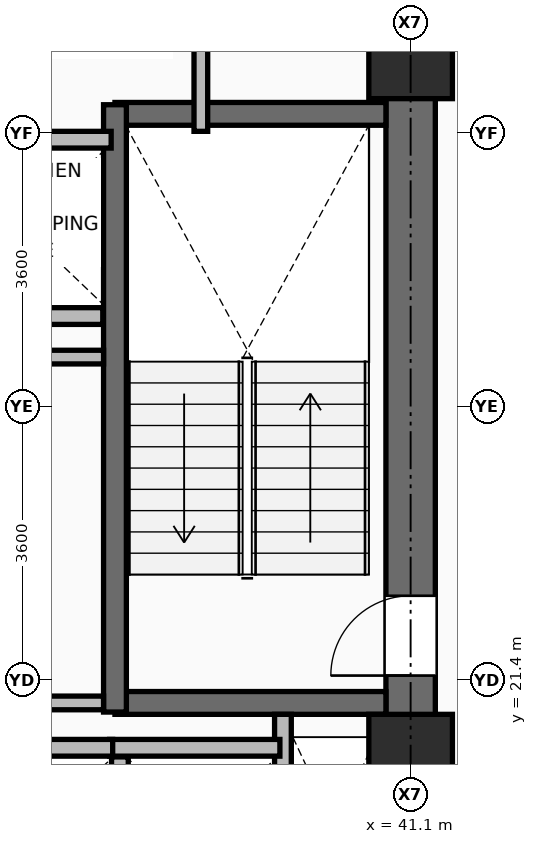
"""IFC4 building model, lengths in metres.
Left out: names, types, materials, properties, quantities, classifications, styles, units other than length and angle.
Written with IfcOpenShell. Run it as: python <this file> out.ifc"""

import sys

from ifc_helpers import new_model, si_unit, direction, frame, frame_2d, origin, origin_2d, place, context, subcontext, project, spatial, rectangle, extrude, element, fill, save


model = new_model("IFC4")
c1 = context("Model", 3, precision=1e-05, world=origin(), true_north=direction((0.0, 1.0)))
c2 = subcontext(c1, "Body", "Model", "MODEL_VIEW")
j1 = project(units=[si_unit("LENGTHUNIT", "METRE"), si_unit("PLANEANGLEUNIT", "RADIAN")], contexts=[c1])
p1 = place(None, origin())
s1 = spatial("IfcSite", under=j1, at=p1, CompositionType="ELEMENT")
p2 = place(p1, origin())
s2 = spatial("IfcBuilding", under=s1, at=p2, CompositionType="ELEMENT")
p3 = place(p2, frame((0.0, 0.0, 57.0)))
s3 = spatial("IfcBuildingStorey", under=s2, at=p3, CompositionType="ELEMENT", Elevation=57.0)
for number, where, z_axis, x_axis in (
    (1, (41.1, 20.4, 0.0), (0.0, 0.0, 1.0), (1.0, 0.0, 0.0)),
    (2, (41.1, 29.6, 0.0), (0.0, 0.0, 1.0), (1.0, 0.0, 0.0)),
):
    element("IfcColumn", number, at=place(p3, frame(where, z_axis=z_axis, x_axis=x_axis)), inside=s3, PredefinedType="COLUMN", context=c2, shape_type="SweptSolid", body=[
        extrude(rectangle(XDim=1.1, YDim=1.1, at=origin_2d()), origin(), (0.0, 0.0, 1.0), 3.75),
    ])
p4 = place(p3, frame((37.275, 18.08, 0.0), z_axis=(0.0, 0.0, 1.0), x_axis=(0.0, 1.0, 0.0)))
e3 = element("IfcWall", 3, at=p4, inside=s3, PredefinedType="PARTITIONING", context=c2, shape_type="SweptSolid", body=[
    extrude(rectangle(XDim=2.31, YDim=0.22, at=frame_2d((1.155, 0.0))), origin(), (0.0, 0.0, 1.0), 3.545),
])
p5 = place(p3, frame((34.91, 26.19, 0.0), z_axis=(0.0, 0.0, 1.0), x_axis=(1.0, 0.0, 0.0)))
e4 = element("IfcWall", 4, at=p5, inside=s3, PredefinedType="PARTITIONING", context=c2, shape_type="SweptSolid", body=[
    extrude(rectangle(XDim=2.14, YDim=0.22, at=frame_2d((1.07, 0.0))), origin(), (0.0, 0.0, 1.0), 3.545),
])
p6 = place(p3, frame((41.1, 18.125, 0.0), z_axis=(0.0, 0.0, 1.0), x_axis=(0.0, 1.0, 0.0)))
e5 = element("IfcWall", 5, at=p6, inside=s3, PredefinedType="SHEAR", context=c2, shape_type="SweptSolid", body=[
    extrude(rectangle(XDim=14.0, YDim=0.65, at=frame_2d((7.0, 0.0))), origin(), (0.0, 0.0, 1.0), 3.57),
])
p7 = place(p6, frame((3.335, 0.0, 0.0)))
e6 = element("IfcOpeningElement", 6, at=p7, cuts=e5, PredefinedType="OPENING", context=c2, shape_type="SweptSolid", body=[
    extrude(rectangle(XDim=1.05, YDim=2.1, at=frame_2d((0.525, 1.05))), frame((0.0, 0.335, 0.0), z_axis=(0.0, -1.0, 0.0), x_axis=(1.0, 0.0, 0.0)), (0.0, 0.0, 1.0), 0.67),
])
for number, where, z_axis, x_axis in (
    (7, (37.21, 21.1, 0.0), (0.0, 0.0, 1.0), (1.0, 0.0, 0.0)),
    (8, (37.21, 28.85, 0.0), (0.0, 0.0, 1.0), (1.0, 0.0, 0.0)),
):
    element("IfcWall", number, at=place(p3, frame(where, z_axis=z_axis, x_axis=x_axis)), inside=s3, PredefinedType="SHEAR", context=c2, shape_type="SweptSolid", body=[
        extrude(rectangle(XDim=3.565, YDim=0.3, at=frame_2d((1.782, 0.0))), origin(), (0.0, 0.0, 1.0), 3.57),
    ])
p8 = place(p3, frame((37.21, 20.98, 0.0), z_axis=(0.0, 0.0, 1.0), x_axis=(0.0, 1.0, 0.0)))
e9 = element("IfcWall", 9, at=p8, inside=s3, PredefinedType="SHEAR", context=c2, shape_type="SweptSolid", body=[
    extrude(rectangle(XDim=7.99, YDim=0.3, at=frame_2d((3.995, 0.0))), origin(), (0.0, 0.0, 1.0), 3.57),
])
p9 = place(p3, frame((39.42, 18.125, 0.0), z_axis=(0.0, 0.0, 1.0), x_axis=(0.0, 1.0, 0.0)))
e10 = element("IfcWall", 10, at=p9, inside=s3, PredefinedType="PARTITIONING", context=c2, shape_type="SweptSolid", body=[
    extrude(rectangle(XDim=2.825, YDim=0.22, at=frame_2d((1.413, 0.0))), origin(), (0.0, 0.0, 1.0), 3.55),
])
for number, where, z_axis, x_axis in (
    (11, (37.14, 20.51, 0.0), (0.0, 0.0, 1.0), (1.0, 0.0, 0.0)),
    (12, (34.94, 20.51, 0.0), (0.0, 0.0, 1.0), (1.0, 0.0, 0.0)),
):
    element("IfcWall", number, at=place(p3, frame(where, z_axis=z_axis, x_axis=x_axis)), inside=s3, PredefinedType="PARTITIONING", context=c2, shape_type="SweptSolid", body=[
        extrude(rectangle(XDim=2.24, YDim=0.22, at=frame_2d((1.12, 0.0))), origin(), (0.0, 0.0, 1.0), 3.55),
    ])
p10 = place(p3, frame((35.56, 28.51, 0.0), z_axis=(0.0, 0.0, 1.0), x_axis=(1.0, 0.0, 0.0)))
e13 = element("IfcWall", 13, at=p10, inside=s3, PredefinedType="PARTITIONING", context=c2, shape_type="SweptSolid", body=[
    extrude(rectangle(XDim=1.6, YDim=0.22, at=frame_2d((0.8, 0.0))), origin(), (0.0, 0.0, 1.0), 3.55),
])
p11 = place(p3, frame((34.98, 21.1, 0.0), z_axis=(0.0, 0.0, 1.0), x_axis=(1.0, 0.0, 0.0)))
e14 = element("IfcWall", 14, at=p11, inside=s3, PredefinedType="PARTITIONING", context=c2, shape_type="SweptSolid", body=[
    extrude(rectangle(XDim=2.08, YDim=0.18, at=frame_2d((1.04, 0.0))), origin(), (0.0, 0.0, 1.0), 3.55),
])
p12 = place(p3, frame((34.72, 25.65, 0.0), z_axis=(0.0, 0.0, 1.0), x_axis=(1.0, 0.0, 0.0)))
e15 = element("IfcWall", 15, at=p12, inside=s3, PredefinedType="PARTITIONING", context=c2, shape_type="SweptSolid", body=[
    extrude(rectangle(XDim=2.34, YDim=0.18, at=frame_2d((1.17, 0.0))), origin(), (0.0, 0.0, 1.0), 3.55),
])
p13 = place(p3, frame((38.34, 28.62, 0.0), z_axis=(0.0, 0.0, 1.0), x_axis=(0.0, 1.0, 0.0)))
e16 = element("IfcWall", 16, at=p13, inside=s3, PredefinedType="PARTITIONING", context=c2, shape_type="SweptSolid", body=[
    extrude(rectangle(XDim=3.505, YDim=0.18, at=frame_2d((1.752, 0.0))), origin(), (0.0, 0.0, 1.0), 3.55),
])
p14 = place(p7, origin())
e17 = element("IfcDoor", 17, at=p14, inside=s3, OperationType="SINGLE_SWING_LEFT", PredefinedType="DOOR", context=c2, shape_type="SweptSolid", body=[
    extrude(rectangle(XDim=1.05, YDim=2.1, at=frame_2d((0.525, 1.05))), frame((0.0, 0.025, 0.0), z_axis=(0.0, -1.0, 0.0), x_axis=(1.0, 0.0, 0.0)), (0.0, 0.0, 1.0), 0.05),
])
fill(e6, e17)
save(model, sys.argv[1])
